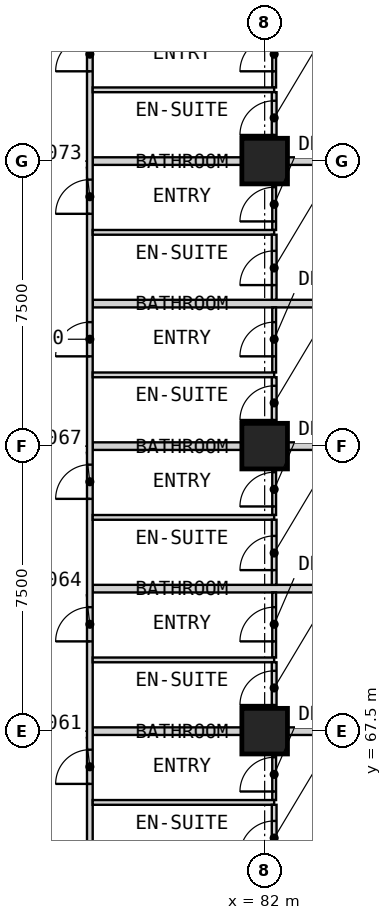
"""IFC4 building model, lengths in metres.
Left out: names, types, materials, properties, quantities, classifications, styles, units other than length and angle.
Written with IfcOpenShell. Run it as: python <this file> out.ifc"""

import sys

from ifc_helpers import new_model, si_unit, direction, frame, frame_2d, origin, origin_2d, place, context, subcontext, project, spatial, rectangle, extrude, element, fill, save


model = new_model("IFC4")
c1 = context("Model", 3, precision=1e-05, world=origin(), true_north=direction((0.0, 1.0)))
c2 = subcontext(c1, "Body", "Model", "MODEL_VIEW")
j1 = project(units=[si_unit("LENGTHUNIT", "METRE"), si_unit("PLANEANGLEUNIT", "RADIAN")], contexts=[c1])
p1 = place(None, origin())
s1 = spatial("IfcSite", under=j1, at=p1, CompositionType="ELEMENT")
p2 = place(p1, origin())
s2 = spatial("IfcBuilding", under=s1, at=p2, CompositionType="ELEMENT")
p3 = place(p2, frame((0.0, 0.0, 34.0)))
s3 = spatial("IfcBuildingStorey", under=s2, at=p3, CompositionType="ELEMENT", Elevation=34.0)
for number, where, z_axis, x_axis in (
    (1, (82.0, 67.5, 0.0), (0.0, 0.0, 1.0), (1.0, 0.0, 0.0)),
    (2, (82.0, 75.0, 0.0), (0.0, 0.0, 1.0), (1.0, 0.0, 0.0)),
    (3, (82.0, 82.5, 0.0), (0.0, 0.0, 1.0), (1.0, 0.0, 0.0)),
):
    element("IfcColumn", number, at=place(p3, frame(where, z_axis=z_axis, x_axis=x_axis)), inside=s3, PredefinedType="COLUMN", context=c2, shape_type="SweptSolid", body=[
        extrude(rectangle(XDim=1.2, YDim=1.2, at=origin_2d()), origin(), (0.0, 0.0, 1.0), 3.6),
    ])
p4 = place(p3, frame((77.475, 67.5, 0.0), z_axis=(0.0, 0.0, 1.0), x_axis=(1.0, 0.0, 0.0)))
e4 = element("IfcWall", 4, at=p4, inside=s3, PredefinedType="PARTITIONING", context=c2, shape_type="SweptSolid", body=[
    extrude(rectangle(XDim=12.525, YDim=0.2, at=frame_2d((6.262, 0.0))), origin(), (0.0, 0.0, 1.0), 3.35),
])
p5 = place(p3, frame((77.475, 71.25, 0.0), z_axis=(0.0, 0.0, 1.0), x_axis=(1.0, 0.0, 0.0)))
e5 = element("IfcWall", 5, at=p5, inside=s3, PredefinedType="PARTITIONING", context=c2, shape_type="SweptSolid", body=[
    extrude(rectangle(XDim=11.715, YDim=0.2, at=frame_2d((5.857, 0.0))), origin(), (0.0, 0.0, 1.0), 3.35),
])
p6 = place(p3, frame((77.475, 75.0, 0.0), z_axis=(0.0, 0.0, 1.0), x_axis=(1.0, 0.0, 0.0)))
e6 = element("IfcWall", 6, at=p6, inside=s3, PredefinedType="PARTITIONING", context=c2, shape_type="SweptSolid", body=[
    extrude(rectangle(XDim=12.525, YDim=0.2, at=frame_2d((6.262, 0.0))), origin(), (0.0, 0.0, 1.0), 3.35),
])
p7 = place(p3, frame((77.475, 78.75, 0.0), z_axis=(0.0, 0.0, 1.0), x_axis=(1.0, 0.0, 0.0)))
e7 = element("IfcWall", 7, at=p7, inside=s3, PredefinedType="PARTITIONING", context=c2, shape_type="SweptSolid", body=[
    extrude(rectangle(XDim=11.715, YDim=0.2, at=frame_2d((5.857, 0.0))), origin(), (0.0, 0.0, 1.0), 3.35),
])
p8 = place(p3, frame((77.475, 82.5, 0.0), z_axis=(0.0, 0.0, 1.0), x_axis=(1.0, 0.0, 0.0)))
e8 = element("IfcWall", 8, at=p8, inside=s3, PredefinedType="PARTITIONING", context=c2, shape_type="SweptSolid", body=[
    extrude(rectangle(XDim=12.525, YDim=0.2, at=frame_2d((6.262, 0.0))), origin(), (0.0, 0.0, 1.0), 3.35),
])
p9 = place(p3, frame((77.4, 50.175, 0.0), z_axis=(0.0, 0.0, 1.0), x_axis=(0.0, 1.0, 0.0)))
e9 = element("IfcWall", 9, at=p9, inside=s3, PredefinedType="PARTITIONING", context=c2, shape_type="SweptSolid", body=[
    extrude(rectangle(XDim=42.15, YDim=0.15, at=frame_2d((21.075, 0.0))), origin(), (0.0, 0.0, 1.0), 3.35),
])
p10 = place(p9, frame((4.688, 0.0, 0.0)))
e10 = element("IfcOpeningElement", 10, at=p10, cuts=e9, PredefinedType="OPENING", context=c2, shape_type="SweptSolid", body=[
    extrude(rectangle(XDim=0.9, YDim=2.1, at=frame_2d((0.45, 1.05))), frame((0.0, 0.085, 0.0), z_axis=(0.0, -1.0, 0.0), x_axis=(1.0, 0.0, 0.0)), (0.0, 0.0, 1.0), 0.17),
])
p11 = place(p9, frame((8.438, 0.0, 0.0)))
e11 = element("IfcOpeningElement", 11, at=p11, cuts=e9, PredefinedType="OPENING", context=c2, shape_type="SweptSolid", body=[
    extrude(rectangle(XDim=0.9, YDim=2.1, at=frame_2d((0.45, 1.05))), frame((0.0, 0.085, 0.0), z_axis=(0.0, -1.0, 0.0), x_axis=(1.0, 0.0, 0.0)), (0.0, 0.0, 1.0), 0.17),
])
p12 = place(p9, frame((12.188, 0.0, 0.0)))
e12 = element("IfcOpeningElement", 12, at=p12, cuts=e9, PredefinedType="OPENING", context=c2, shape_type="SweptSolid", body=[
    extrude(rectangle(XDim=0.9, YDim=2.1, at=frame_2d((0.45, 1.05))), frame((0.0, 0.085, 0.0), z_axis=(0.0, -1.0, 0.0), x_axis=(1.0, 0.0, 0.0)), (0.0, 0.0, 1.0), 0.17),
])
p13 = place(p9, frame((15.938, 0.0, 0.0)))
e13 = element("IfcOpeningElement", 13, at=p13, cuts=e9, PredefinedType="OPENING", context=c2, shape_type="SweptSolid", body=[
    extrude(rectangle(XDim=0.9, YDim=2.1, at=frame_2d((0.45, 1.05))), frame((0.0, 0.085, 0.0), z_axis=(0.0, -1.0, 0.0), x_axis=(1.0, 0.0, 0.0)), (0.0, 0.0, 1.0), 0.17),
])
p14 = place(p9, frame((19.688, 0.0, 0.0)))
e14 = element("IfcOpeningElement", 14, at=p14, cuts=e9, PredefinedType="OPENING", context=c2, shape_type="SweptSolid", body=[
    extrude(rectangle(XDim=0.9, YDim=2.1, at=frame_2d((0.45, 1.05))), frame((0.0, 0.085, 0.0), z_axis=(0.0, -1.0, 0.0), x_axis=(1.0, 0.0, 0.0)), (0.0, 0.0, 1.0), 0.17),
])
p15 = place(p9, frame((23.438, 0.0, 0.0)))
e15 = element("IfcOpeningElement", 15, at=p15, cuts=e9, PredefinedType="OPENING", context=c2, shape_type="SweptSolid", body=[
    extrude(rectangle(XDim=0.9, YDim=2.1, at=frame_2d((0.45, 1.05))), frame((0.0, 0.085, 0.0), z_axis=(0.0, -1.0, 0.0), x_axis=(1.0, 0.0, 0.0)), (0.0, 0.0, 1.0), 0.17),
])
p16 = place(p9, frame((27.188, 0.0, 0.0)))
e16 = element("IfcOpeningElement", 16, at=p16, cuts=e9, PredefinedType="OPENING", context=c2, shape_type="SweptSolid", body=[
    extrude(rectangle(XDim=0.9, YDim=2.1, at=frame_2d((0.45, 1.05))), frame((0.0, 0.085, 0.0), z_axis=(0.0, -1.0, 0.0), x_axis=(1.0, 0.0, 0.0)), (0.0, 0.0, 1.0), 0.17),
])
p17 = place(p9, frame((30.938, 0.0, 0.0)))
e17 = element("IfcOpeningElement", 17, at=p17, cuts=e9, PredefinedType="OPENING", context=c2, shape_type="SweptSolid", body=[
    extrude(rectangle(XDim=0.9, YDim=2.1, at=frame_2d((0.45, 1.05))), frame((0.0, 0.085, 0.0), z_axis=(0.0, -1.0, 0.0), x_axis=(1.0, 0.0, 0.0)), (0.0, 0.0, 1.0), 0.17),
])
p18 = place(p9, frame((34.688, 0.0, 0.0)))
e18 = element("IfcOpeningElement", 18, at=p18, cuts=e9, PredefinedType="OPENING", context=c2, shape_type="SweptSolid", body=[
    extrude(rectangle(XDim=0.9, YDim=2.1, at=frame_2d((0.45, 1.05))), frame((0.0, 0.085, 0.0), z_axis=(0.0, -1.0, 0.0), x_axis=(1.0, 0.0, 0.0)), (0.0, 0.0, 1.0), 0.17),
])
p19 = place(p9, frame((38.438, 0.0, 0.0)))
e19 = element("IfcOpeningElement", 19, at=p19, cuts=e9, PredefinedType="OPENING", context=c2, shape_type="SweptSolid", body=[
    extrude(rectangle(XDim=0.9, YDim=2.1, at=frame_2d((0.45, 1.05))), frame((0.0, 0.085, 0.0), z_axis=(0.0, -1.0, 0.0), x_axis=(1.0, 0.0, 0.0)), (0.0, 0.0, 1.0), 0.17),
])
p20 = place(p3, frame((82.25, 65.688, 0.0), z_axis=(0.0, 0.0, 1.0), x_axis=(0.0, 1.0, 0.0)))
e20 = element("IfcWall", 20, at=p20, inside=s3, PredefinedType="PARTITIONING", context=c2, shape_type="SweptSolid", body=[
    extrude(rectangle(XDim=1.712, YDim=0.1, at=frame_2d((0.856, 0.0))), origin(), (0.0, 0.0, 1.0), 3.35),
])
p21 = place(p20, frame((0.225, 0.0, 0.0)))
e21 = element("IfcOpeningElement", 21, at=p21, cuts=e20, PredefinedType="OPENING", context=c2, shape_type="SweptSolid", body=[
    extrude(rectangle(XDim=0.9, YDim=2.1, at=frame_2d((0.45, 1.05))), frame((0.0, 0.06, 0.0), z_axis=(0.0, -1.0, 0.0), x_axis=(1.0, 0.0, 0.0)), (0.0, 0.0, 1.0), 0.12),
])
p22 = place(p3, frame((82.25, 69.438, 0.0), z_axis=(0.0, 0.0, 1.0), x_axis=(0.0, 1.0, 0.0)))
e22 = element("IfcWall", 22, at=p22, inside=s3, PredefinedType="PARTITIONING", context=c2, shape_type="SweptSolid", body=[
    extrude(rectangle(XDim=1.712, YDim=0.1, at=frame_2d((0.856, 0.0))), origin(), (0.0, 0.0, 1.0), 3.35),
])
p23 = place(p22, frame((0.425, 0.0, 0.0)))
e23 = element("IfcOpeningElement", 23, at=p23, cuts=e22, PredefinedType="OPENING", context=c2, shape_type="SweptSolid", body=[
    extrude(rectangle(XDim=0.9, YDim=2.1, at=frame_2d((0.45, 1.05))), frame((0.0, 0.06, 0.0), z_axis=(0.0, -1.0, 0.0), x_axis=(1.0, 0.0, 0.0)), (0.0, 0.0, 1.0), 0.12),
])
p24 = place(p3, frame((82.25, 73.188, 0.0), z_axis=(0.0, 0.0, 1.0), x_axis=(0.0, 1.0, 0.0)))
e24 = element("IfcWall", 24, at=p24, inside=s3, PredefinedType="PARTITIONING", context=c2, shape_type="SweptSolid", body=[
    extrude(rectangle(XDim=1.712, YDim=0.1, at=frame_2d((0.856, 0.0))), origin(), (0.0, 0.0, 1.0), 3.35),
])
p25 = place(p24, frame((0.225, 0.0, 0.0)))
e25 = element("IfcOpeningElement", 25, at=p25, cuts=e24, PredefinedType="OPENING", context=c2, shape_type="SweptSolid", body=[
    extrude(rectangle(XDim=0.9, YDim=2.1, at=frame_2d((0.45, 1.05))), frame((0.0, 0.06, 0.0), z_axis=(0.0, -1.0, 0.0), x_axis=(1.0, 0.0, 0.0)), (0.0, 0.0, 1.0), 0.12),
])
p26 = place(p3, frame((82.25, 76.938, 0.0), z_axis=(0.0, 0.0, 1.0), x_axis=(0.0, 1.0, 0.0)))
e26 = element("IfcWall", 26, at=p26, inside=s3, PredefinedType="PARTITIONING", context=c2, shape_type="SweptSolid", body=[
    extrude(rectangle(XDim=1.712, YDim=0.1, at=frame_2d((0.856, 0.0))), origin(), (0.0, 0.0, 1.0), 3.35),
])
p27 = place(p26, frame((0.425, 0.0, 0.0)))
e27 = element("IfcOpeningElement", 27, at=p27, cuts=e26, PredefinedType="OPENING", context=c2, shape_type="SweptSolid", body=[
    extrude(rectangle(XDim=0.9, YDim=2.1, at=frame_2d((0.45, 1.05))), frame((0.0, 0.06, 0.0), z_axis=(0.0, -1.0, 0.0), x_axis=(1.0, 0.0, 0.0)), (0.0, 0.0, 1.0), 0.12),
])
p28 = place(p3, frame((82.25, 80.688, 0.0), z_axis=(0.0, 0.0, 1.0), x_axis=(0.0, 1.0, 0.0)))
e28 = element("IfcWall", 28, at=p28, inside=s3, PredefinedType="PARTITIONING", context=c2, shape_type="SweptSolid", body=[
    extrude(rectangle(XDim=1.712, YDim=0.1, at=frame_2d((0.856, 0.0))), origin(), (0.0, 0.0, 1.0), 3.35),
])
p29 = place(p28, frame((0.225, 0.0, 0.0)))
e29 = element("IfcOpeningElement", 29, at=p29, cuts=e28, PredefinedType="OPENING", context=c2, shape_type="SweptSolid", body=[
    extrude(rectangle(XDim=0.9, YDim=2.1, at=frame_2d((0.45, 1.05))), frame((0.0, 0.06, 0.0), z_axis=(0.0, -1.0, 0.0), x_axis=(1.0, 0.0, 0.0)), (0.0, 0.0, 1.0), 0.12),
])
p30 = place(p3, frame((82.25, 84.438, 0.0), z_axis=(0.0, 0.0, 1.0), x_axis=(0.0, 1.0, 0.0)))
e30 = element("IfcWall", 30, at=p30, inside=s3, PredefinedType="PARTITIONING", context=c2, shape_type="SweptSolid", body=[
    extrude(rectangle(XDim=1.712, YDim=0.1, at=frame_2d((0.856, 0.0))), origin(), (0.0, 0.0, 1.0), 3.35),
])
p31 = place(p30, frame((0.425, 0.0, 0.0)))
e31 = element("IfcOpeningElement", 31, at=p31, cuts=e30, PredefinedType="OPENING", context=c2, shape_type="SweptSolid", body=[
    extrude(rectangle(XDim=0.9, YDim=2.1, at=frame_2d((0.45, 1.05))), frame((0.0, 0.06, 0.0), z_axis=(0.0, -1.0, 0.0), x_axis=(1.0, 0.0, 0.0)), (0.0, 0.0, 1.0), 0.12),
])
for number, where, z_axis, x_axis in (
    (32, (77.475, 65.625, 0.0), (0.0, 0.0, 1.0), (1.0, 0.0, 0.0)),
    (33, (77.475, 69.375, 0.0), (0.0, 0.0, 1.0), (1.0, 0.0, 0.0)),
    (34, (77.475, 73.125, 0.0), (0.0, 0.0, 1.0), (1.0, 0.0, 0.0)),
    (35, (77.475, 76.875, 0.0), (0.0, 0.0, 1.0), (1.0, 0.0, 0.0)),
    (36, (77.475, 80.625, 0.0), (0.0, 0.0, 1.0), (1.0, 0.0, 0.0)),
    (37, (77.475, 84.375, 0.0), (0.0, 0.0, 1.0), (1.0, 0.0, 0.0)),
):
    element("IfcWall", number, at=place(p3, frame(where, z_axis=z_axis, x_axis=x_axis)), inside=s3, PredefinedType="PARTITIONING", context=c2, shape_type="SweptSolid", body=[
        extrude(rectangle(XDim=4.775, YDim=0.125, at=frame_2d((2.387, 0.0))), origin(), (0.0, 0.0, 1.0), 3.35),
    ])
p32 = place(p3, frame((82.25, 63.85, 0.0), z_axis=(0.0, 0.0, 1.0), x_axis=(0.0, 1.0, 0.0)))
e38 = element("IfcWall", 38, at=p32, inside=s3, PredefinedType="PARTITIONING", context=c2, shape_type="SweptSolid", body=[
    extrude(rectangle(XDim=1.712, YDim=0.125, at=frame_2d((0.856, 0.0))), origin(), (0.0, 0.0, 1.0), 3.35),
])
p33 = place(p32, frame((0.387, 0.0, 0.0)))
e39 = element("IfcOpeningElement", 39, at=p33, cuts=e38, PredefinedType="OPENING", context=c2, shape_type="SweptSolid", body=[
    extrude(rectangle(XDim=0.9, YDim=2.1, at=frame_2d((0.45, 1.05))), frame((0.0, 0.073, 0.0), z_axis=(0.0, -1.0, 0.0), x_axis=(1.0, 0.0, 0.0)), (0.0, 0.0, 1.0), 0.145),
])
p34 = place(p3, frame((82.25, 67.6, 0.0), z_axis=(0.0, 0.0, 1.0), x_axis=(0.0, 1.0, 0.0)))
e40 = element("IfcWall", 40, at=p34, inside=s3, PredefinedType="PARTITIONING", context=c2, shape_type="SweptSolid", body=[
    extrude(rectangle(XDim=1.712, YDim=0.125, at=frame_2d((0.856, 0.0))), origin(), (0.0, 0.0, 1.0), 3.35),
])
p35 = place(p34, frame((0.587, 0.0, 0.0)))
e41 = element("IfcOpeningElement", 41, at=p35, cuts=e40, PredefinedType="OPENING", context=c2, shape_type="SweptSolid", body=[
    extrude(rectangle(XDim=0.9, YDim=2.1, at=frame_2d((0.45, 1.05))), frame((0.0, 0.073, 0.0), z_axis=(0.0, -1.0, 0.0), x_axis=(1.0, 0.0, 0.0)), (0.0, 0.0, 1.0), 0.145),
])
p36 = place(p3, frame((82.25, 71.35, 0.0), z_axis=(0.0, 0.0, 1.0), x_axis=(0.0, 1.0, 0.0)))
e42 = element("IfcWall", 42, at=p36, inside=s3, PredefinedType="PARTITIONING", context=c2, shape_type="SweptSolid", body=[
    extrude(rectangle(XDim=1.712, YDim=0.125, at=frame_2d((0.856, 0.0))), origin(), (0.0, 0.0, 1.0), 3.35),
])
p37 = place(p36, frame((0.387, 0.0, 0.0)))
e43 = element("IfcOpeningElement", 43, at=p37, cuts=e42, PredefinedType="OPENING", context=c2, shape_type="SweptSolid", body=[
    extrude(rectangle(XDim=0.9, YDim=2.1, at=frame_2d((0.45, 1.05))), frame((0.0, 0.073, 0.0), z_axis=(0.0, -1.0, 0.0), x_axis=(1.0, 0.0, 0.0)), (0.0, 0.0, 1.0), 0.145),
])
p38 = place(p3, frame((82.25, 75.1, 0.0), z_axis=(0.0, 0.0, 1.0), x_axis=(0.0, 1.0, 0.0)))
e44 = element("IfcWall", 44, at=p38, inside=s3, PredefinedType="PARTITIONING", context=c2, shape_type="SweptSolid", body=[
    extrude(rectangle(XDim=1.712, YDim=0.125, at=frame_2d((0.856, 0.0))), origin(), (0.0, 0.0, 1.0), 3.35),
])
p39 = place(p38, frame((0.587, 0.0, 0.0)))
e45 = element("IfcOpeningElement", 45, at=p39, cuts=e44, PredefinedType="OPENING", context=c2, shape_type="SweptSolid", body=[
    extrude(rectangle(XDim=0.9, YDim=2.1, at=frame_2d((0.45, 1.05))), frame((0.0, 0.073, 0.0), z_axis=(0.0, -1.0, 0.0), x_axis=(1.0, 0.0, 0.0)), (0.0, 0.0, 1.0), 0.145),
])
p40 = place(p3, frame((82.25, 78.85, 0.0), z_axis=(0.0, 0.0, 1.0), x_axis=(0.0, 1.0, 0.0)))
e46 = element("IfcWall", 46, at=p40, inside=s3, PredefinedType="PARTITIONING", context=c2, shape_type="SweptSolid", body=[
    extrude(rectangle(XDim=1.712, YDim=0.125, at=frame_2d((0.856, 0.0))), origin(), (0.0, 0.0, 1.0), 3.35),
])
p41 = place(p40, frame((0.387, 0.0, 0.0)))
e47 = element("IfcOpeningElement", 47, at=p41, cuts=e46, PredefinedType="OPENING", context=c2, shape_type="SweptSolid", body=[
    extrude(rectangle(XDim=0.9, YDim=2.1, at=frame_2d((0.45, 1.05))), frame((0.0, 0.073, 0.0), z_axis=(0.0, -1.0, 0.0), x_axis=(1.0, 0.0, 0.0)), (0.0, 0.0, 1.0), 0.145),
])
p42 = place(p3, frame((82.25, 82.6, 0.0), z_axis=(0.0, 0.0, 1.0), x_axis=(0.0, 1.0, 0.0)))
e48 = element("IfcWall", 48, at=p42, inside=s3, PredefinedType="PARTITIONING", context=c2, shape_type="SweptSolid", body=[
    extrude(rectangle(XDim=1.712, YDim=0.125, at=frame_2d((0.856, 0.0))), origin(), (0.0, 0.0, 1.0), 3.35),
])
p43 = place(p42, frame((0.587, 0.0, 0.0)))
e49 = element("IfcOpeningElement", 49, at=p43, cuts=e48, PredefinedType="OPENING", context=c2, shape_type="SweptSolid", body=[
    extrude(rectangle(XDim=0.9, YDim=2.1, at=frame_2d((0.45, 1.05))), frame((0.0, 0.073, 0.0), z_axis=(0.0, -1.0, 0.0), x_axis=(1.0, 0.0, 0.0)), (0.0, 0.0, 1.0), 0.145),
])
p44 = place(p33, origin())
e50 = element("IfcDoor", 50, at=p44, inside=s3, OperationType="SINGLE_SWING_LEFT", PredefinedType="DOOR", context=c2, shape_type="SweptSolid", body=[
    extrude(rectangle(XDim=0.9, YDim=2.1, at=frame_2d((0.45, 1.05))), frame((0.0, 0.025, 0.0), z_axis=(0.0, -1.0, 0.0), x_axis=(1.0, 0.0, 0.0)), (0.0, 0.0, 1.0), 0.05),
])
fill(e39, e50)
p45 = place(p13, origin())
e51 = element("IfcDoor", 51, at=p45, inside=s3, OperationType="SINGLE_SWING_RIGHT", PredefinedType="DOOR", context=c2, shape_type="SweptSolid", body=[
    extrude(rectangle(XDim=0.9, YDim=2.1, at=frame_2d((0.45, 1.05))), frame((0.0, 0.025, 0.0), z_axis=(0.0, -1.0, 0.0), x_axis=(1.0, 0.0, 0.0)), (0.0, 0.0, 1.0), 0.05),
])
fill(e13, e51)
p46 = place(p21, origin())
e52 = element("IfcDoor", 52, at=p46, inside=s3, OperationType="SINGLE_SWING_LEFT", PredefinedType="DOOR", context=c2, shape_type="SweptSolid", body=[
    extrude(rectangle(XDim=0.9, YDim=2.1, at=frame_2d((0.45, 1.05))), frame((0.0, 0.025, 0.0), z_axis=(0.0, -1.0, 0.0), x_axis=(1.0, 0.0, 0.0)), (0.0, 0.0, 1.0), 0.05),
])
fill(e21, e52)
p47 = place(p35, origin())
e53 = element("IfcDoor", 53, at=p47, inside=s3, OperationType="SINGLE_SWING_RIGHT", PredefinedType="DOOR", context=c2, shape_type="SweptSolid", body=[
    extrude(rectangle(XDim=0.9, YDim=2.1, at=frame_2d((0.45, 1.05))), frame((0.0, 0.025, 0.0), z_axis=(0.0, -1.0, 0.0), x_axis=(1.0, 0.0, 0.0)), (0.0, 0.0, 1.0), 0.05),
])
fill(e41, e53)
p48 = place(p14, origin())
e54 = element("IfcDoor", 54, at=p48, inside=s3, OperationType="SINGLE_SWING_RIGHT", PredefinedType="DOOR", context=c2, shape_type="SweptSolid", body=[
    extrude(rectangle(XDim=0.9, YDim=2.1, at=frame_2d((0.45, 1.05))), frame((0.0, 0.025, 0.0), z_axis=(0.0, -1.0, 0.0), x_axis=(1.0, 0.0, 0.0)), (0.0, 0.0, 1.0), 0.05),
])
fill(e14, e54)
p49 = place(p23, origin())
e55 = element("IfcDoor", 55, at=p49, inside=s3, OperationType="SINGLE_SWING_LEFT", PredefinedType="DOOR", context=c2, shape_type="SweptSolid", body=[
    extrude(rectangle(XDim=0.9, YDim=2.1, at=frame_2d((0.45, 1.05))), frame((0.0, 0.025, 0.0), z_axis=(0.0, -1.0, 0.0), x_axis=(1.0, 0.0, 0.0)), (0.0, 0.0, 1.0), 0.05),
])
fill(e23, e55)
p50 = place(p37, origin())
e56 = element("IfcDoor", 56, at=p50, inside=s3, OperationType="SINGLE_SWING_LEFT", PredefinedType="DOOR", context=c2, shape_type="SweptSolid", body=[
    extrude(rectangle(XDim=0.9, YDim=2.1, at=frame_2d((0.45, 1.05))), frame((0.0, 0.025, 0.0), z_axis=(0.0, -1.0, 0.0), x_axis=(1.0, 0.0, 0.0)), (0.0, 0.0, 1.0), 0.05),
])
fill(e43, e56)
p51 = place(p15, origin())
e57 = element("IfcDoor", 57, at=p51, inside=s3, OperationType="SINGLE_SWING_RIGHT", PredefinedType="DOOR", context=c2, shape_type="SweptSolid", body=[
    extrude(rectangle(XDim=0.9, YDim=2.1, at=frame_2d((0.45, 1.05))), frame((0.0, 0.025, 0.0), z_axis=(0.0, -1.0, 0.0), x_axis=(1.0, 0.0, 0.0)), (0.0, 0.0, 1.0), 0.05),
])
fill(e15, e57)
p52 = place(p25, origin())
e58 = element("IfcDoor", 58, at=p52, inside=s3, OperationType="SINGLE_SWING_LEFT", PredefinedType="DOOR", context=c2, shape_type="SweptSolid", body=[
    extrude(rectangle(XDim=0.9, YDim=2.1, at=frame_2d((0.45, 1.05))), frame((0.0, 0.025, 0.0), z_axis=(0.0, -1.0, 0.0), x_axis=(1.0, 0.0, 0.0)), (0.0, 0.0, 1.0), 0.05),
])
fill(e25, e58)
p53 = place(p39, origin())
e59 = element("IfcDoor", 59, at=p53, inside=s3, OperationType="SINGLE_SWING_RIGHT", PredefinedType="DOOR", context=c2, shape_type="SweptSolid", body=[
    extrude(rectangle(XDim=0.9, YDim=2.1, at=frame_2d((0.45, 1.05))), frame((0.0, 0.025, 0.0), z_axis=(0.0, -1.0, 0.0), x_axis=(1.0, 0.0, 0.0)), (0.0, 0.0, 1.0), 0.05),
])
fill(e45, e59)
p54 = place(p16, origin())
e60 = element("IfcDoor", 60, at=p54, inside=s3, OperationType="SINGLE_SWING_RIGHT", PredefinedType="DOOR", context=c2, shape_type="SweptSolid", body=[
    extrude(rectangle(XDim=0.9, YDim=2.1, at=frame_2d((0.45, 1.05))), frame((0.0, 0.025, 0.0), z_axis=(0.0, -1.0, 0.0), x_axis=(1.0, 0.0, 0.0)), (0.0, 0.0, 1.0), 0.05),
])
fill(e16, e60)
p55 = place(p27, origin())
e61 = element("IfcDoor", 61, at=p55, inside=s3, OperationType="SINGLE_SWING_LEFT", PredefinedType="DOOR", context=c2, shape_type="SweptSolid", body=[
    extrude(rectangle(XDim=0.9, YDim=2.1, at=frame_2d((0.45, 1.05))), frame((0.0, 0.025, 0.0), z_axis=(0.0, -1.0, 0.0), x_axis=(1.0, 0.0, 0.0)), (0.0, 0.0, 1.0), 0.05),
])
fill(e27, e61)
p56 = place(p41, origin())
e62 = element("IfcDoor", 62, at=p56, inside=s3, OperationType="SINGLE_SWING_LEFT", PredefinedType="DOOR", context=c2, shape_type="SweptSolid", body=[
    extrude(rectangle(XDim=0.9, YDim=2.1, at=frame_2d((0.45, 1.05))), frame((0.0, 0.025, 0.0), z_axis=(0.0, -1.0, 0.0), x_axis=(1.0, 0.0, 0.0)), (0.0, 0.0, 1.0), 0.05),
])
fill(e47, e62)
p57 = place(p17, origin())
e63 = element("IfcDoor", 63, at=p57, inside=s3, OperationType="SINGLE_SWING_RIGHT", PredefinedType="DOOR", context=c2, shape_type="SweptSolid", body=[
    extrude(rectangle(XDim=0.9, YDim=2.1, at=frame_2d((0.45, 1.05))), frame((0.0, 0.025, 0.0), z_axis=(0.0, -1.0, 0.0), x_axis=(1.0, 0.0, 0.0)), (0.0, 0.0, 1.0), 0.05),
])
fill(e17, e63)
p58 = place(p29, origin())
e64 = element("IfcDoor", 64, at=p58, inside=s3, OperationType="SINGLE_SWING_LEFT", PredefinedType="DOOR", context=c2, shape_type="SweptSolid", body=[
    extrude(rectangle(XDim=0.9, YDim=2.1, at=frame_2d((0.45, 1.05))), frame((0.0, 0.025, 0.0), z_axis=(0.0, -1.0, 0.0), x_axis=(1.0, 0.0, 0.0)), (0.0, 0.0, 1.0), 0.05),
])
fill(e29, e64)
p59 = place(p43, origin())
e65 = element("IfcDoor", 65, at=p59, inside=s3, OperationType="SINGLE_SWING_RIGHT", PredefinedType="DOOR", context=c2, shape_type="SweptSolid", body=[
    extrude(rectangle(XDim=0.9, YDim=2.1, at=frame_2d((0.45, 1.05))), frame((0.0, 0.025, 0.0), z_axis=(0.0, -1.0, 0.0), x_axis=(1.0, 0.0, 0.0)), (0.0, 0.0, 1.0), 0.05),
])
fill(e49, e65)
p60 = place(p18, origin())
e66 = element("IfcDoor", 66, at=p60, inside=s3, OperationType="SINGLE_SWING_RIGHT", PredefinedType="DOOR", context=c2, shape_type="SweptSolid", body=[
    extrude(rectangle(XDim=0.9, YDim=2.1, at=frame_2d((0.45, 1.05))), frame((0.0, 0.025, 0.0), z_axis=(0.0, -1.0, 0.0), x_axis=(1.0, 0.0, 0.0)), (0.0, 0.0, 1.0), 0.05),
])
fill(e18, e66)
p61 = place(p31, origin())
e67 = element("IfcDoor", 67, at=p61, inside=s3, OperationType="SINGLE_SWING_LEFT", PredefinedType="DOOR", context=c2, shape_type="SweptSolid", body=[
    extrude(rectangle(XDim=0.9, YDim=2.1, at=frame_2d((0.45, 1.05))), frame((0.0, 0.025, 0.0), z_axis=(0.0, -1.0, 0.0), x_axis=(1.0, 0.0, 0.0)), (0.0, 0.0, 1.0), 0.05),
])
fill(e31, e67)
save(model, sys.argv[1])
